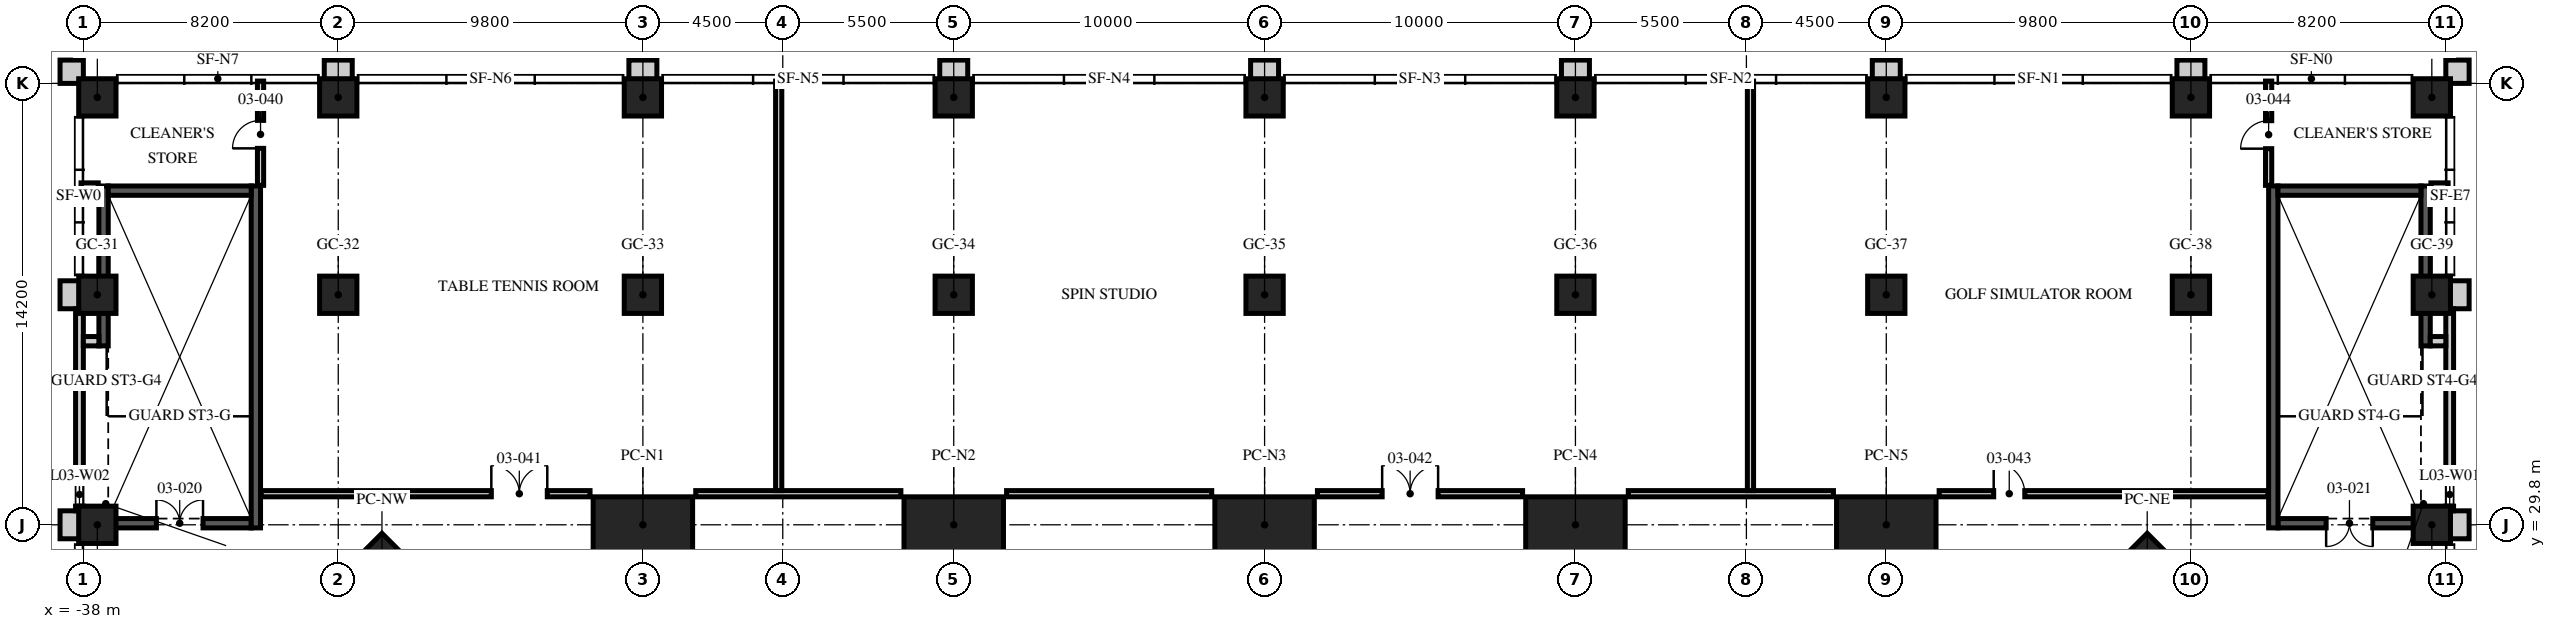
"""IFC4 building model, lengths in metres.
Left out: names, types, materials, properties, quantities, classifications, styles, units other than length and angle.
Written with IfcOpenShell. Run it as: python <this file> out.ifc"""

import sys

from ifc_helpers import new_model, si_unit, direction, frame, frame_2d, origin, origin_2d, place, context, subcontext, project, spatial, rectangle, hollow_rectangle, extrude, element, fill, save


model = new_model("IFC4")
c1 = context("Model", 3, precision=1e-05, world=origin(), true_north=direction((0.0, 1.0)))
c2 = subcontext(c1, "Body", "Model", "MODEL_VIEW")
j1 = project(units=[si_unit("LENGTHUNIT", "METRE"), si_unit("PLANEANGLEUNIT", "RADIAN")], contexts=[c1])
p1 = place(None, origin())
s1 = spatial("IfcSite", under=j1, at=p1, CompositionType="ELEMENT")
p2 = place(p1, origin())
s2 = spatial("IfcBuilding", under=s1, at=p2, CompositionType="ELEMENT")
p3 = place(p2, frame((0.0, 0.0, 16.0)))
s3 = spatial("IfcBuildingStorey", under=s2, at=p3, CompositionType="ELEMENT", Elevation=16.0)
for number, where, z_axis, x_axis in (
    (1, (-20.0, 29.8, 0.0), (0.0, 0.0, 1.0), (1.0, 0.0, 0.0)),
    (2, (-10.0, 29.8, 0.0), (0.0, 0.0, 1.0), (1.0, 0.0, 0.0)),
    (3, (0.0, 29.8, 0.0), (0.0, 0.0, 1.0), (1.0, 0.0, 0.0)),
    (4, (10.0, 29.8, 0.0), (0.0, 0.0, 1.0), (1.0, 0.0, 0.0)),
    (5, (20.0, 29.8, 0.0), (0.0, 0.0, 1.0), (1.0, 0.0, 0.0)),
):
    element("IfcColumn", number, at=place(p3, frame(where, z_axis=z_axis, x_axis=x_axis)), inside=s3, PredefinedType="COLUMN", context=c2, shape_type="SweptSolid", body=[
        extrude(hollow_rectangle(XDim=3.2, YDim=1.8, WallThickness=0.2, at=origin_2d()), origin(), (0.0, 0.0, 1.0), 5.0),
    ])
for number, where, z_axis, x_axis in (
    (6, (28.394, 28.394, 0.0), (0.0, 0.0, 1.0), (0.707, -0.707, 0.0)),
    (7, (-28.394, 28.394, 0.0), (0.0, 0.0, 1.0), (0.707, 0.707, 0.0)),
):
    element("IfcColumn", number, at=place(p3, frame(where, z_axis=z_axis, x_axis=x_axis)), inside=s3, PredefinedType="COLUMN", context=c2, shape_type="SweptSolid", body=[
        extrude(hollow_rectangle(XDim=1.6, YDim=1.6, WallThickness=0.1, at=origin_2d()), origin(), (0.0, 0.0, 1.0), 5.0),
    ])
for number, where, z_axis, x_axis in (
    (8, (-37.55, 29.8, 0.0), (0.0, 0.0, 1.0), (1.0, 0.0, 0.0)),
    (9, (37.55, 29.8, 0.0), (0.0, 0.0, 1.0), (1.0, 0.0, 0.0)),
    (10, (-37.55, 37.2, 0.0), (0.0, 0.0, 1.0), (1.0, 0.0, 0.0)),
    (11, (-29.8, 37.2, 0.0), (0.0, 0.0, 1.0), (1.0, 0.0, 0.0)),
    (12, (-20.0, 37.2, 0.0), (0.0, 0.0, 1.0), (1.0, 0.0, 0.0)),
    (13, (-10.0, 37.2, 0.0), (0.0, 0.0, 1.0), (1.0, 0.0, 0.0)),
    (14, (0.0, 37.2, 0.0), (0.0, 0.0, 1.0), (1.0, 0.0, 0.0)),
    (15, (10.0, 37.2, 0.0), (0.0, 0.0, 1.0), (1.0, 0.0, 0.0)),
    (16, (20.0, 37.2, 0.0), (0.0, 0.0, 1.0), (1.0, 0.0, 0.0)),
    (17, (29.8, 37.2, 0.0), (0.0, 0.0, 1.0), (1.0, 0.0, 0.0)),
    (18, (37.55, 37.2, 0.0), (0.0, 0.0, 1.0), (1.0, 0.0, 0.0)),
    (19, (-37.55, 43.55, 0.0), (0.0, 0.0, 1.0), (1.0, 0.0, 0.0)),
    (20, (-29.8, 43.55, 0.0), (0.0, 0.0, 1.0), (1.0, 0.0, 0.0)),
    (21, (-20.0, 43.55, 0.0), (0.0, 0.0, 1.0), (1.0, 0.0, 0.0)),
    (22, (-10.0, 43.55, 0.0), (0.0, 0.0, 1.0), (1.0, 0.0, 0.0)),
    (23, (0.0, 43.55, 0.0), (0.0, 0.0, 1.0), (1.0, 0.0, 0.0)),
    (24, (10.0, 43.55, 0.0), (0.0, 0.0, 1.0), (1.0, 0.0, 0.0)),
    (25, (20.0, 43.55, 0.0), (0.0, 0.0, 1.0), (1.0, 0.0, 0.0)),
    (26, (29.8, 43.55, 0.0), (0.0, 0.0, 1.0), (1.0, 0.0, 0.0)),
    (27, (37.55, 43.55, 0.0), (0.0, 0.0, 1.0), (1.0, 0.0, 0.0)),
):
    element("IfcColumn", number, at=place(p3, frame(where, z_axis=z_axis, x_axis=x_axis)), inside=s3, PredefinedType="COLUMN", context=c2, shape_type="SweptSolid", body=[
        extrude(rectangle(XDim=1.2, YDim=1.2, at=origin_2d()), origin(), (0.0, 0.0, 1.0), 5.0),
    ])
for number, where, z_axis, x_axis in (
    (28, (38.375, 29.35, 0.0), (0.0, 0.0, 1.0), (0.0, 1.0, 0.0)),
    (29, (38.375, 36.75, 0.0), (0.0, 0.0, 1.0), (0.0, 1.0, 0.0)),
):
    element("IfcWall", number, at=place(p3, frame(where, z_axis=z_axis, x_axis=x_axis)), inside=s3, PredefinedType="SOLIDWALL", context=c2, shape_type="SweptSolid", body=[
        extrude(rectangle(XDim=0.9, YDim=0.75, at=frame_2d((0.45, 0.0))), origin(), (0.0, 0.0, 1.0), 5.0),
    ])
p4 = place(p3, frame((38.375, 44.0, 0.0), z_axis=(0.0, 0.0, 1.0), x_axis=(0.0, 1.0, 0.0)))
e30 = element("IfcWall", 30, at=p4, inside=s3, PredefinedType="SOLIDWALL", context=c2, shape_type="SweptSolid", body=[
    extrude(rectangle(XDim=0.75, YDim=0.75, at=frame_2d((0.375, 0.0))), origin(), (0.0, 0.0, 1.0), 5.0),
])
p5 = place(p3, frame((38.125, 30.25, 0.0), z_axis=(0.0, 0.0, 1.0), x_axis=(0.0, 1.0, 0.0)))
e31 = element("IfcWall", 31, at=p5, inside=s3, PredefinedType="SOLIDWALL", context=c2, shape_type="SweptSolid", body=[
    extrude(rectangle(XDim=6.5, YDim=0.25, at=frame_2d((3.25, 0.0))), origin(), (0.0, 0.0, 1.0), 5.0),
])
p6 = place(p5, frame((0.15, 0.0, 1.2)))
e32 = element("IfcOpeningElement", 32, at=p6, cuts=e31, PredefinedType="OPENING", context=c2, shape_type="SweptSolid", body=[
    extrude(rectangle(XDim=0.75, YDim=1.7, at=frame_2d((0.375, 0.85))), frame((0.0, 0.135, 0.0), z_axis=(0.0, -1.0, 0.0), x_axis=(1.0, 0.0, 0.0)), (0.0, 0.0, 1.0), 0.27),
])
for number, where, z_axis, x_axis in (
    (33, (30.25, 44.375, 0.0), (0.0, 0.0, 1.0), (-1.0, 0.0, 0.0)),
    (34, (20.45, 44.375, 0.0), (0.0, 0.0, 1.0), (-1.0, 0.0, 0.0)),
    (35, (10.45, 44.375, 0.0), (0.0, 0.0, 1.0), (-1.0, 0.0, 0.0)),
    (36, (0.45, 44.375, 0.0), (0.0, 0.0, 1.0), (-1.0, 0.0, 0.0)),
    (37, (-9.55, 44.375, 0.0), (0.0, 0.0, 1.0), (-1.0, 0.0, 0.0)),
    (38, (-19.55, 44.375, 0.0), (0.0, 0.0, 1.0), (-1.0, 0.0, 0.0)),
    (39, (-29.35, 44.375, 0.0), (0.0, 0.0, 1.0), (-1.0, 0.0, 0.0)),
):
    element("IfcWall", number, at=place(p3, frame(where, z_axis=z_axis, x_axis=x_axis)), inside=s3, PredefinedType="SOLIDWALL", context=c2, shape_type="SweptSolid", body=[
        extrude(rectangle(XDim=0.9, YDim=0.75, at=frame_2d((0.45, 0.0))), origin(), (0.0, 0.0, 1.0), 5.0),
    ])
p7 = place(p3, frame((-38.0, 44.375, 0.0), z_axis=(0.0, 0.0, 1.0), x_axis=(-1.0, 0.0, 0.0)))
e40 = element("IfcWall", 40, at=p7, inside=s3, PredefinedType="SOLIDWALL", context=c2, shape_type="SweptSolid", body=[
    extrude(rectangle(XDim=0.75, YDim=0.75, at=frame_2d((0.375, 0.0))), origin(), (0.0, 0.0, 1.0), 5.0),
])
for number, where, z_axis, x_axis in (
    (41, (-38.375, 37.65, 0.0), (0.0, 0.0, 1.0), (0.0, -1.0, 0.0)),
    (42, (-38.375, 30.25, 0.0), (0.0, 0.0, 1.0), (0.0, -1.0, 0.0)),
):
    element("IfcWall", number, at=place(p3, frame(where, z_axis=z_axis, x_axis=x_axis)), inside=s3, PredefinedType="SOLIDWALL", context=c2, shape_type="SweptSolid", body=[
        extrude(rectangle(XDim=0.9, YDim=0.75, at=frame_2d((0.45, 0.0))), origin(), (0.0, 0.0, 1.0), 5.0),
    ])
p8 = place(p3, frame((-38.125, 36.75, 0.0), z_axis=(0.0, 0.0, 1.0), x_axis=(0.0, -1.0, 0.0)))
e43 = element("IfcWall", 43, at=p8, inside=s3, PredefinedType="SOLIDWALL", context=c2, shape_type="SweptSolid", body=[
    extrude(rectangle(XDim=6.5, YDim=0.25, at=frame_2d((3.25, 0.0))), origin(), (0.0, 0.0, 1.0), 5.0),
])
p9 = place(p8, frame((5.6, 0.0, 1.2)))
e44 = element("IfcOpeningElement", 44, at=p9, cuts=e43, PredefinedType="OPENING", context=c2, shape_type="SweptSolid", body=[
    extrude(rectangle(XDim=0.75, YDim=1.7, at=frame_2d((0.375, 0.85))), frame((0.0, 0.135, 0.0), z_axis=(0.0, -1.0, 0.0), x_axis=(1.0, 0.0, 0.0)), (0.0, 0.0, 1.0), 0.27),
])
p10 = place(p3, frame((-37.35, 35.556, 0.0), z_axis=(0.0, 0.0, 1.0), x_axis=(0.0, 1.0, 0.0)))
e45 = element("IfcWall", 45, at=p10, inside=s3, PredefinedType="SOLIDWALL", context=c2, shape_type="SweptSolid", body=[
    extrude(rectangle(XDim=5.144, YDim=0.3, at=frame_2d((2.572, 0.0))), origin(), (0.0, 0.0, 1.0), 4.75),
])
p11 = place(p3, frame((-38.0, 35.706, 0.0), z_axis=(0.0, 0.0, 1.0), x_axis=(1.0, 0.0, 0.0)))
e46 = element("IfcWall", 46, at=p11, inside=s3, PredefinedType="PARTITIONING", context=c2, shape_type="SweptSolid", body=[
    extrude(rectangle(XDim=0.5, YDim=0.3, at=frame_2d((0.25, 0.0))), origin(), (0.0, 0.0, 1.0), 3.65),
])
p12 = place(p3, frame((-38.0, 29.85, 0.0), z_axis=(0.0, 0.0, 1.0), x_axis=(1.0, 0.0, 0.0)))
e47 = element("IfcWall", 47, at=p12, inside=s3, PredefinedType="SOLIDWALL", context=c2, shape_type="SweptSolid", body=[
    extrude(rectangle(XDim=5.4, YDim=0.3, at=frame_2d((2.7, 0.0))), origin(), (0.0, 0.0, 1.0), 4.75),
])
p13 = place(p12, frame((2.35, 0.0, 0.0)))
e48 = element("IfcOpeningElement", 48, at=p13, cuts=e47, PredefinedType="OPENING", context=c2, shape_type="SweptSolid", body=[
    extrude(rectangle(XDim=1.5, YDim=2.1, at=frame_2d((0.75, 1.05))), frame((0.0, 0.16, 0.0), z_axis=(0.0, -1.0, 0.0), x_axis=(1.0, 0.0, 0.0)), (0.0, 0.0, 1.0), 0.32),
])
p14 = place(p3, frame((-32.45, 29.7, 0.0), z_axis=(0.0, 0.0, 1.0), x_axis=(0.0, 1.0, 0.0)))
e49 = element("IfcWall", 49, at=p14, inside=s3, PredefinedType="SOLIDWALL", context=c2, shape_type="SweptSolid", body=[
    extrude(rectangle(XDim=11.0, YDim=0.3, at=frame_2d((5.5, 0.0))), origin(), (0.0, 0.0, 1.0), 4.75),
])
p15 = place(p3, frame((-37.2, 40.55, 0.0), z_axis=(0.0, 0.0, 1.0), x_axis=(1.0, 0.0, 0.0)))
e50 = element("IfcWall", 50, at=p15, inside=s3, PredefinedType="SOLIDWALL", context=c2, shape_type="SweptSolid", body=[
    extrude(rectangle(XDim=4.6, YDim=0.3, at=frame_2d((2.3, 0.0))), origin(), (0.0, 0.0, 1.0), 4.75),
])
p16 = place(p3, frame((37.35, 35.556, 0.0), z_axis=(0.0, 0.0, 1.0), x_axis=(0.0, 1.0, 0.0)))
e51 = element("IfcWall", 51, at=p16, inside=s3, PredefinedType="SOLIDWALL", context=c2, shape_type="SweptSolid", body=[
    extrude(rectangle(XDim=5.144, YDim=0.3, at=frame_2d((2.572, 0.0))), origin(), (0.0, 0.0, 1.0), 4.75),
])
p17 = place(p3, frame((38.0, 35.706, 0.0), z_axis=(0.0, 0.0, 1.0), x_axis=(-1.0, 0.0, 0.0)))
e52 = element("IfcWall", 52, at=p17, inside=s3, PredefinedType="PARTITIONING", context=c2, shape_type="SweptSolid", body=[
    extrude(rectangle(XDim=0.5, YDim=0.3, at=frame_2d((0.25, 0.0))), origin(), (0.0, 0.0, 1.0), 3.65),
])
p18 = place(p3, frame((38.0, 29.85, 0.0), z_axis=(0.0, 0.0, 1.0), x_axis=(-1.0, 0.0, 0.0)))
e53 = element("IfcWall", 53, at=p18, inside=s3, PredefinedType="SOLIDWALL", context=c2, shape_type="SweptSolid", body=[
    extrude(rectangle(XDim=5.4, YDim=0.3, at=frame_2d((2.7, 0.0))), origin(), (0.0, 0.0, 1.0), 4.75),
])
p19 = place(p18, frame((2.35, 0.0, 0.0)))
e54 = element("IfcOpeningElement", 54, at=p19, cuts=e53, PredefinedType="OPENING", context=c2, shape_type="SweptSolid", body=[
    extrude(rectangle(XDim=1.5, YDim=2.1, at=frame_2d((0.75, 1.05))), frame((0.0, 0.16, 0.0), z_axis=(0.0, -1.0, 0.0), x_axis=(1.0, 0.0, 0.0)), (0.0, 0.0, 1.0), 0.32),
])
p20 = place(p3, frame((32.45, 29.7, 0.0), z_axis=(0.0, 0.0, 1.0), x_axis=(0.0, 1.0, 0.0)))
e55 = element("IfcWall", 55, at=p20, inside=s3, PredefinedType="SOLIDWALL", context=c2, shape_type="SweptSolid", body=[
    extrude(rectangle(XDim=11.0, YDim=0.3, at=frame_2d((5.5, 0.0))), origin(), (0.0, 0.0, 1.0), 4.75),
])
p21 = place(p3, frame((37.2, 40.55, 0.0), z_axis=(0.0, 0.0, 1.0), x_axis=(-1.0, 0.0, 0.0)))
e56 = element("IfcWall", 56, at=p21, inside=s3, PredefinedType="SOLIDWALL", context=c2, shape_type="SweptSolid", body=[
    extrude(rectangle(XDim=4.6, YDim=0.3, at=frame_2d((2.3, 0.0))), origin(), (0.0, 0.0, 1.0), 4.75),
])
p22 = place(p3, frame((-32.28, 30.8, 0.0), z_axis=(0.0, 0.0, 1.0), x_axis=(1.0, 0.0, 0.0)))
e57 = element("IfcWall", 57, at=p22, inside=s3, PredefinedType="SOLIDWALL", context=c2, shape_type="SweptSolid", body=[
    extrude(rectangle(XDim=10.58, YDim=0.2, at=frame_2d((5.29, 0.0))), origin(), (0.0, 0.0, 1.0), 4.75),
])
p23 = place(p22, frame((7.405, 0.0, 0.0)))
e58 = element("IfcOpeningElement", 58, at=p23, cuts=e57, PredefinedType="OPENING", context=c2, shape_type="SweptSolid", body=[
    extrude(rectangle(XDim=1.8, YDim=2.4, at=frame_2d((0.9, 1.2))), frame((0.0, 0.11, 0.0), z_axis=(0.0, -1.0, 0.0), x_axis=(1.0, 0.0, 0.0)), (0.0, 0.0, 1.0), 0.22),
])
for number, where, z_axis, x_axis in (
    (59, (-18.3, 30.8, 0.0), (0.0, 0.0, 1.0), (1.0, 0.0, 0.0)),
    (60, (-8.3, 30.8, 0.0), (0.0, 0.0, 1.0), (1.0, 0.0, 0.0)),
):
    element("IfcWall", number, at=place(p3, frame(where, z_axis=z_axis, x_axis=x_axis)), inside=s3, PredefinedType="SOLIDWALL", context=c2, shape_type="SweptSolid", body=[
        extrude(rectangle(XDim=6.6, YDim=0.2, at=frame_2d((3.3, 0.0))), origin(), (0.0, 0.0, 1.0), 4.75),
    ])
p24 = place(p3, frame((1.7, 30.8, 0.0), z_axis=(0.0, 0.0, 1.0), x_axis=(1.0, 0.0, 0.0)))
e61 = element("IfcWall", 61, at=p24, inside=s3, PredefinedType="SOLIDWALL", context=c2, shape_type="SweptSolid", body=[
    extrude(rectangle(XDim=6.6, YDim=0.2, at=frame_2d((3.3, 0.0))), origin(), (0.0, 0.0, 1.0), 4.75),
])
p25 = place(p24, frame((2.082, 0.0, 0.0)))
e62 = element("IfcOpeningElement", 62, at=p25, cuts=e61, PredefinedType="OPENING", context=c2, shape_type="SweptSolid", body=[
    extrude(rectangle(XDim=1.8, YDim=2.4, at=frame_2d((0.9, 1.2))), frame((0.0, 0.11, 0.0), z_axis=(0.0, -1.0, 0.0), x_axis=(1.0, 0.0, 0.0)), (0.0, 0.0, 1.0), 0.22),
])
p26 = place(p3, frame((11.7, 30.8, 0.0), z_axis=(0.0, 0.0, 1.0), x_axis=(1.0, 0.0, 0.0)))
e63 = element("IfcWall", 63, at=p26, inside=s3, PredefinedType="SOLIDWALL", context=c2, shape_type="SweptSolid", body=[
    extrude(rectangle(XDim=6.6, YDim=0.2, at=frame_2d((3.3, 0.0))), origin(), (0.0, 0.0, 1.0), 4.75),
])
p27 = place(p3, frame((21.7, 30.8, 0.0), z_axis=(0.0, 0.0, 1.0), x_axis=(1.0, 0.0, 0.0)))
e64 = element("IfcWall", 64, at=p27, inside=s3, PredefinedType="SOLIDWALL", context=c2, shape_type="SweptSolid", body=[
    extrude(rectangle(XDim=10.58, YDim=0.2, at=frame_2d((5.29, 0.0))), origin(), (0.0, 0.0, 1.0), 4.75),
])
p28 = place(p27, frame((1.755, 0.0, 0.0)))
e65 = element("IfcOpeningElement", 65, at=p28, cuts=e64, PredefinedType="OPENING", context=c2, shape_type="SweptSolid", body=[
    extrude(rectangle(XDim=1.0, YDim=2.1, at=frame_2d((0.5, 1.05))), frame((0.0, 0.11, 0.0), z_axis=(0.0, -1.0, 0.0), x_axis=(1.0, 0.0, 0.0)), (0.0, 0.0, 1.0), 0.22),
])
for number, where, z_axis, x_axis in (
    (66, (-15.631, 30.9, 0.0), (0.0, 0.0, 1.0), (0.0, 1.0, 0.0)),
    (67, (15.631, 30.9, 0.0), (0.0, 0.0, 1.0), (0.0, 1.0, 0.0)),
):
    element("IfcWall", number, at=place(p3, frame(where, z_axis=z_axis, x_axis=x_axis)), inside=s3, PredefinedType="SOLIDWALL", context=c2, shape_type="SweptSolid", body=[
        extrude(rectangle(XDim=13.175, YDim=0.2, at=frame_2d((6.587, 0.0))), origin(), (0.0, 0.0, 1.0), 3.65),
    ])
for number, where, z_axis, x_axis in (
    (68, (-38.075, 40.7, 0.0), (0.0, 0.0, 1.0), (1.0, 0.0, 0.0)),
    (69, (37.52, 40.7, 0.0), (0.0, 0.0, 1.0), (1.0, 0.0, 0.0)),
):
    element("IfcWall", number, at=place(p3, frame(where, z_axis=z_axis, x_axis=x_axis)), inside=s3, PredefinedType="SOLIDWALL", context=c2, shape_type="SweptSolid", body=[
        extrude(rectangle(XDim=0.555, YDim=0.2, at=frame_2d((0.277, 0.0))), origin(), (0.0, 0.0, 1.0), 3.65),
    ])
p29 = place(p3, frame((-32.3, 40.72, 0.0), z_axis=(0.0, 0.0, 1.0), x_axis=(0.0, 1.0, 0.0)))
e70 = element("IfcWall", 70, at=p29, inside=s3, PredefinedType="SOLIDWALL", context=c2, shape_type="SweptSolid", body=[
    extrude(rectangle(XDim=3.355, YDim=0.2, at=frame_2d((1.677, 0.0))), origin(), (0.0, 0.0, 1.0), 3.65),
])
p30 = place(p29, frame((1.19, 0.0, 0.0)))
e71 = element("IfcOpeningElement", 71, at=p30, cuts=e70, PredefinedType="OPENING", context=c2, shape_type="SweptSolid", body=[
    extrude(rectangle(XDim=0.9, YDim=2.1, at=frame_2d((0.45, 1.05))), frame((0.0, 0.11, 0.0), z_axis=(0.0, -1.0, 0.0), x_axis=(1.0, 0.0, 0.0)), (0.0, 0.0, 1.0), 0.22),
])
p31 = place(p3, frame((32.3, 40.72, 0.0), z_axis=(0.0, 0.0, 1.0), x_axis=(0.0, 1.0, 0.0)))
e72 = element("IfcWall", 72, at=p31, inside=s3, PredefinedType="SOLIDWALL", context=c2, shape_type="SweptSolid", body=[
    extrude(rectangle(XDim=3.355, YDim=0.2, at=frame_2d((1.677, 0.0))), origin(), (0.0, 0.0, 1.0), 3.65),
])
p32 = place(p31, frame((1.18, 0.0, 0.0)))
e73 = element("IfcOpeningElement", 73, at=p32, cuts=e72, PredefinedType="OPENING", context=c2, shape_type="SweptSolid", body=[
    extrude(rectangle(XDim=0.9, YDim=2.1, at=frame_2d((0.45, 1.05))), frame((0.0, 0.11, 0.0), z_axis=(0.0, -1.0, 0.0), x_axis=(1.0, 0.0, 0.0)), (0.0, 0.0, 1.0), 0.22),
])
p33 = place(p6, origin())
e74 = element("IfcWindow", 74, at=p33, inside=s3, PartitioningType="SINGLE_PANEL", PredefinedType="WINDOW", context=c2, shape_type="SweptSolid", body=[
    extrude(rectangle(XDim=0.75, YDim=1.7, at=frame_2d((0.375, 0.85))), frame((0.0, 0.03, 0.0), z_axis=(0.0, -1.0, 0.0), x_axis=(1.0, 0.0, 0.0)), (0.0, 0.0, 1.0), 0.06),
])
fill(e32, e74)
p34 = place(p9, origin())
e75 = element("IfcWindow", 75, at=p34, inside=s3, PartitioningType="SINGLE_PANEL", PredefinedType="WINDOW", context=c2, shape_type="SweptSolid", body=[
    extrude(rectangle(XDim=0.75, YDim=1.7, at=frame_2d((0.375, 0.85))), frame((0.0, 0.03, 0.0), z_axis=(0.0, -1.0, 0.0), x_axis=(1.0, 0.0, 0.0)), (0.0, 0.0, 1.0), 0.06),
])
fill(e44, e75)
p35 = place(p13, origin())
e76 = element("IfcDoor", 76, at=p35, inside=s3, OperationType="DOUBLE_DOOR_SINGLE_SWING", PredefinedType="DOOR", context=c2, shape_type="SweptSolid", body=[
    extrude(rectangle(XDim=1.5, YDim=2.1, at=frame_2d((0.75, 1.05))), frame((0.0, 0.025, 0.0), z_axis=(0.0, -1.0, 0.0), x_axis=(1.0, 0.0, 0.0)), (0.0, 0.0, 1.0), 0.05),
])
fill(e48, e76)
p36 = place(p19, origin())
e77 = element("IfcDoor", 77, at=p36, inside=s3, OperationType="DOUBLE_DOOR_SINGLE_SWING", PredefinedType="DOOR", context=c2, shape_type="SweptSolid", body=[
    extrude(rectangle(XDim=1.5, YDim=2.1, at=frame_2d((0.75, 1.05))), frame((0.0, 0.025, 0.0), z_axis=(0.0, -1.0, 0.0), x_axis=(1.0, 0.0, 0.0)), (0.0, 0.0, 1.0), 0.05),
])
fill(e54, e77)
p37 = place(p30, origin())
e78 = element("IfcDoor", 78, at=p37, inside=s3, OperationType="SINGLE_SWING_LEFT", PredefinedType="DOOR", context=c2, shape_type="SweptSolid", body=[
    extrude(rectangle(XDim=0.9, YDim=2.1, at=frame_2d((0.45, 1.05))), frame((0.0, 0.025, 0.0), z_axis=(0.0, -1.0, 0.0), x_axis=(1.0, 0.0, 0.0)), (0.0, 0.0, 1.0), 0.05),
])
fill(e71, e78)
p38 = place(p23, origin())
e79 = element("IfcDoor", 79, at=p38, inside=s3, OperationType="DOUBLE_DOOR_SINGLE_SWING", PredefinedType="DOOR", context=c2, shape_type="SweptSolid", body=[
    extrude(rectangle(XDim=1.8, YDim=2.4, at=frame_2d((0.9, 1.2))), frame((0.0, 0.025, 0.0), z_axis=(0.0, -1.0, 0.0), x_axis=(1.0, 0.0, 0.0)), (0.0, 0.0, 1.0), 0.05),
])
fill(e58, e79)
p39 = place(p25, origin())
e80 = element("IfcDoor", 80, at=p39, inside=s3, OperationType="DOUBLE_DOOR_SINGLE_SWING", PredefinedType="DOOR", context=c2, shape_type="SweptSolid", body=[
    extrude(rectangle(XDim=1.8, YDim=2.4, at=frame_2d((0.9, 1.2))), frame((0.0, 0.025, 0.0), z_axis=(0.0, -1.0, 0.0), x_axis=(1.0, 0.0, 0.0)), (0.0, 0.0, 1.0), 0.05),
])
fill(e62, e80)
p40 = place(p28, origin())
e81 = element("IfcDoor", 81, at=p40, inside=s3, OperationType="SINGLE_SWING_LEFT", PredefinedType="DOOR", context=c2, shape_type="SweptSolid", body=[
    extrude(rectangle(XDim=1.0, YDim=2.1, at=frame_2d((0.5, 1.05))), frame((0.0, 0.025, 0.0), z_axis=(0.0, -1.0, 0.0), x_axis=(1.0, 0.0, 0.0)), (0.0, 0.0, 1.0), 0.05),
])
fill(e65, e81)
p41 = place(p32, origin())
e82 = element("IfcDoor", 82, at=p41, inside=s3, OperationType="SINGLE_SWING_LEFT", PredefinedType="DOOR", context=c2, shape_type="SweptSolid", body=[
    extrude(rectangle(XDim=0.9, YDim=2.1, at=frame_2d((0.45, 1.05))), frame((0.0, 0.025, 0.0), z_axis=(0.0, -1.0, 0.0), x_axis=(1.0, 0.0, 0.0)), (0.0, 0.0, 1.0), 0.05),
])
fill(e73, e82)
save(model, sys.argv[1])
